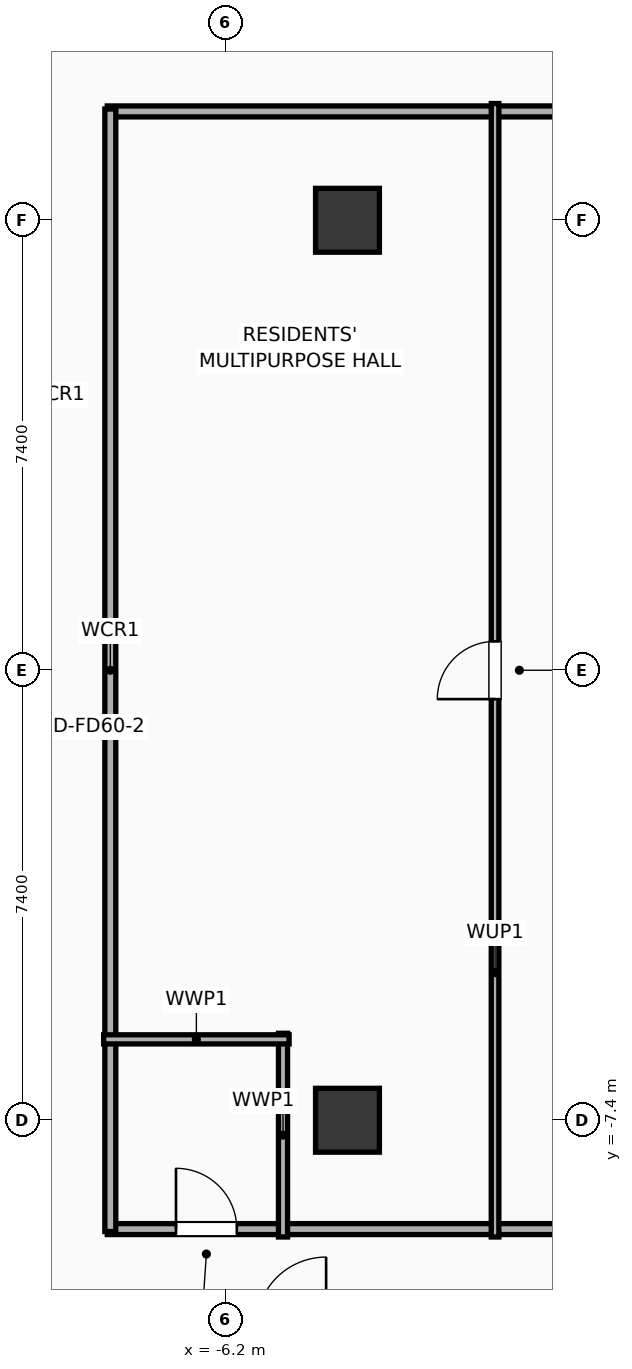
"""IFC4 building model, lengths in metres.
Left out: names, types, materials, properties, quantities, classifications, styles, units other than length and angle.
Written with IfcOpenShell. Run it as: python <this file> out.ifc"""

import sys

from ifc_helpers import new_model, si_unit, direction, frame, frame_2d, origin, origin_2d, place, context, subcontext, project, spatial, rectangle, extrude, element, fill, save


model = new_model("IFC4")
c1 = context("Model", 3, precision=1e-05, world=origin(), true_north=direction((0.0, 1.0)))
c2 = subcontext(c1, "Body", "Model", "MODEL_VIEW")
j1 = project(units=[si_unit("LENGTHUNIT", "METRE"), si_unit("PLANEANGLEUNIT", "RADIAN")], contexts=[c1])
p1 = place(None, origin())
s1 = spatial("IfcSite", under=j1, at=p1, CompositionType="ELEMENT")
p2 = place(p1, origin())
s2 = spatial("IfcBuilding", under=s1, at=p2, CompositionType="ELEMENT")
p3 = place(p2, frame((0.0, 0.0, 61.1)))
s3 = spatial("IfcBuildingStorey", under=s2, at=p3, CompositionType="ELEMENT", Elevation=61.1)
for number, where, z_axis, x_axis in (
    (1, (-4.2, -7.4, 0.0), (0.0, 0.0, 1.0), (1.0, 0.0, 0.0)),
    (2, (-4.2, 7.4, 0.0), (0.0, 0.0, 1.0), (1.0, 0.0, 0.0)),
):
    element("IfcColumn", number, at=place(p3, frame(where, z_axis=z_axis, x_axis=x_axis)), inside=s3, PredefinedType="COLUMN", context=c2, shape_type="SweptSolid", body=[
        extrude(rectangle(XDim=1.05, YDim=1.05, at=origin_2d()), origin(), (0.0, 0.0, 1.0), 3.9),
    ])
p4 = place(p3, frame((-8.15, 9.19, 0.0), z_axis=(0.0, 0.0, 1.0), x_axis=(1.0, 0.0, 0.0)))
e3 = element("IfcWall", 3, at=p4, inside=s3, PredefinedType="PARTITIONING", context=c2, shape_type="SweptSolid", body=[
    extrude(rectangle(XDim=16.3, YDim=0.18, at=frame_2d((8.15, 0.0))), origin(), (0.0, 0.0, 1.0), 3.65),
])
p5 = place(p4, frame((8.49, 0.0, 0.0)))
e4 = element("IfcOpeningElement", 4, at=p5, cuts=e3, PredefinedType="OPENING", context=c2, shape_type="SweptSolid", body=[
    extrude(rectangle(XDim=0.95, YDim=2.05, at=frame_2d((0.475, 1.025))), frame((0.0, 0.1, 0.0), z_axis=(0.0, -1.0, 0.0), x_axis=(1.0, 0.0, 0.0)), (0.0, 0.0, 1.0), 0.2),
])
p6 = place(p3, frame((-8.15, -9.19, 0.0), z_axis=(0.0, 0.0, 1.0), x_axis=(1.0, 0.0, 0.0)))
e5 = element("IfcWall", 5, at=p6, inside=s3, PredefinedType="PARTITIONING", context=c2, shape_type="SweptSolid", body=[
    extrude(rectangle(XDim=16.3, YDim=0.18, at=frame_2d((8.15, 0.0))), origin(), (0.0, 0.0, 1.0), 3.65),
])
p7 = place(p6, frame((1.13, 0.0, 0.0)))
e6 = element("IfcOpeningElement", 6, at=p7, cuts=e5, PredefinedType="OPENING", context=c2, shape_type="SweptSolid", body=[
    extrude(rectangle(XDim=1.0, YDim=2.05, at=frame_2d((0.5, 1.025))), frame((0.0, 0.1, 0.0), z_axis=(0.0, -1.0, 0.0), x_axis=(1.0, 0.0, 0.0)), (0.0, 0.0, 1.0), 0.2),
])
p8 = place(p6, frame((10.12, 0.0, 0.0)))
e7 = element("IfcOpeningElement", 7, at=p8, cuts=e5, PredefinedType="OPENING", context=c2, shape_type="SweptSolid", body=[
    extrude(rectangle(XDim=0.95, YDim=2.05, at=frame_2d((0.475, 1.025))), frame((0.0, 0.1, 0.0), z_axis=(0.0, -1.0, 0.0), x_axis=(1.0, 0.0, 0.0)), (0.0, 0.0, 1.0), 0.2),
])
p9 = place(p3, frame((-8.1, -9.23, 0.0), z_axis=(0.0, 0.0, 1.0), x_axis=(0.0, 1.0, 0.0)))
e8 = element("IfcWall", 8, at=p9, inside=s3, PredefinedType="PARTITIONING", context=c2, shape_type="SweptSolid", body=[
    extrude(rectangle(XDim=18.46, YDim=0.18, at=frame_2d((9.23, 0.0))), origin(), (0.0, 0.0, 1.0), 3.65),
])
p10 = place(p3, frame((-5.26, -9.32, 0.0), z_axis=(0.0, 0.0, 1.0), x_axis=(0.0, 1.0, 0.0)))
e9 = element("IfcWall", 9, at=p10, inside=s3, PredefinedType="PLUMBINGWALL", context=c2, shape_type="SweptSolid", body=[
    extrude(rectangle(XDim=3.35, YDim=0.15, at=frame_2d((1.675, 0.0))), origin(), (0.0, 0.0, 1.0), 3.65),
])
p11 = place(p3, frame((-8.21, -6.07, 0.0), z_axis=(0.0, 0.0, 1.0), x_axis=(1.0, 0.0, 0.0)))
e10 = element("IfcWall", 10, at=p11, inside=s3, PredefinedType="PLUMBINGWALL", context=c2, shape_type="SweptSolid", body=[
    extrude(rectangle(XDim=3.05, YDim=0.15, at=frame_2d((1.525, 0.0))), origin(), (0.0, 0.0, 1.0), 3.65),
])
p12 = place(p3, frame((-1.773, -9.32, 0.0), z_axis=(0.0, 0.0, 1.0), x_axis=(0.0, 1.0, 0.0)))
e11 = element("IfcWall", 11, at=p12, inside=s3, PredefinedType="PARTITIONING", context=c2, shape_type="SweptSolid", body=[
    extrude(rectangle(XDim=18.64, YDim=0.125, at=frame_2d((9.32, 0.0))), origin(), (0.0, 0.0, 1.0), 3.65),
])
p13 = place(p12, frame((8.845, 0.0, 0.0)))
e12 = element("IfcOpeningElement", 12, at=p13, cuts=e11, PredefinedType="OPENING", context=c2, shape_type="SweptSolid", body=[
    extrude(rectangle(XDim=0.95, YDim=2.05, at=frame_2d((0.475, 1.025))), frame((0.0, 0.073, 0.0), z_axis=(0.0, -1.0, 0.0), x_axis=(1.0, 0.0, 0.0)), (0.0, 0.0, 1.0), 0.145),
])
p14 = place(p7, origin())
e13 = element("IfcDoor", 13, at=p14, inside=s3, OperationType="SINGLE_SWING_LEFT", PredefinedType="DOOR", context=c2, shape_type="SweptSolid", body=[
    extrude(rectangle(XDim=1.0, YDim=2.05, at=frame_2d((0.5, 1.025))), frame((0.0, 0.025, 0.0), z_axis=(0.0, -1.0, 0.0), x_axis=(1.0, 0.0, 0.0)), (0.0, 0.0, 1.0), 0.05),
])
fill(e6, e13)
p15 = place(p13, origin())
e14 = element("IfcDoor", 14, at=p15, inside=s3, OperationType="SINGLE_SWING_LEFT", PredefinedType="DOOR", context=c2, shape_type="SweptSolid", body=[
    extrude(rectangle(XDim=0.95, YDim=2.05, at=frame_2d((0.475, 1.025))), frame((0.0, 0.025, 0.0), z_axis=(0.0, -1.0, 0.0), x_axis=(1.0, 0.0, 0.0)), (0.0, 0.0, 1.0), 0.05),
])
fill(e12, e14)
save(model, sys.argv[1])
